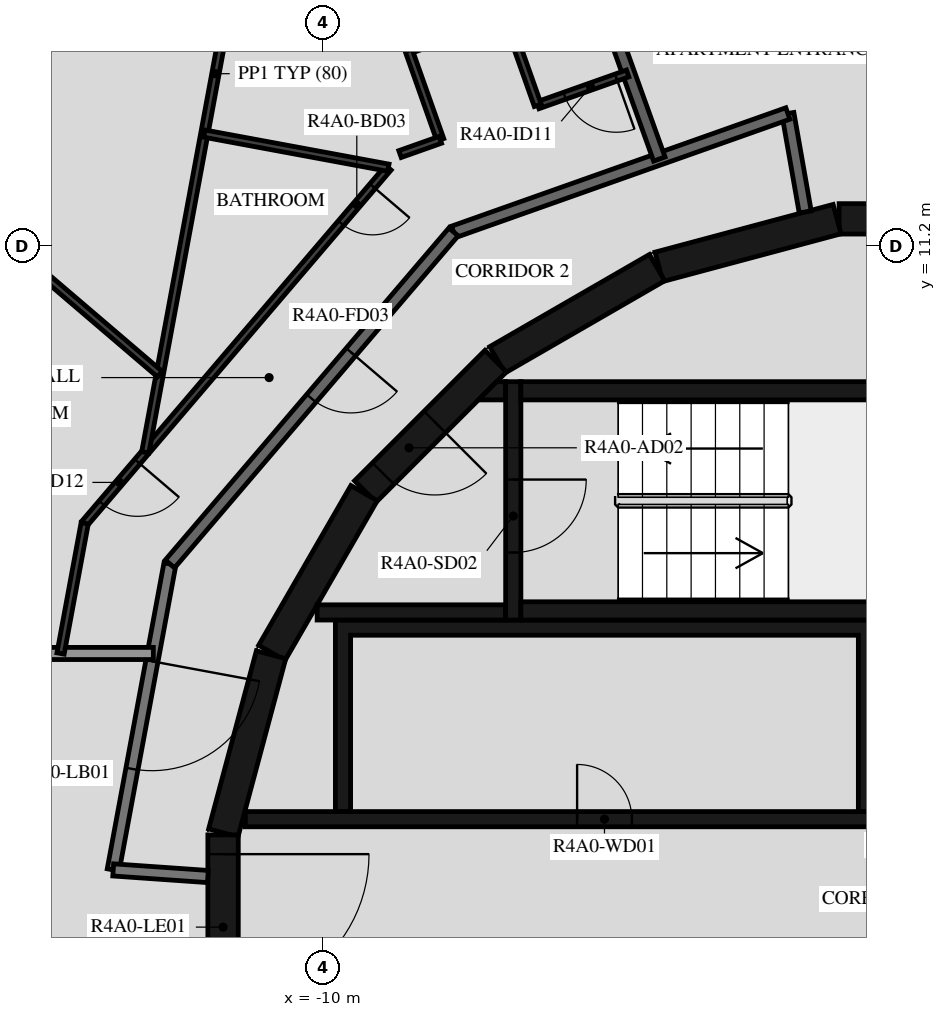
"""IFC4 building model, lengths in metres.
Left out: names, types, materials, properties, quantities, classifications, styles, units other than length and angle.
Written with IfcOpenShell. Run it as: python <this file> out.ifc"""

import sys

from ifc_helpers import new_model, si_unit, direction, frame, frame_2d, origin, place, context, subcontext, project, spatial, polyline, rectangle, outline, extrude, element, fill, save


model = new_model("IFC4")
c1 = context("Model", 3, precision=1e-05, world=origin(), true_north=direction((0.0, 1.0)))
c2 = subcontext(c1, "Body", "Model", "MODEL_VIEW")
j1 = project(units=[si_unit("LENGTHUNIT", "METRE"), si_unit("PLANEANGLEUNIT", "RADIAN")], contexts=[c1])
p1 = place(None, origin())
s1 = spatial("IfcSite", under=j1, at=p1, CompositionType="ELEMENT")
p2 = place(p1, origin())
s2 = spatial("IfcBuilding", under=s1, at=p2, CompositionType="ELEMENT")
p3 = place(p2, frame((0.0, 0.0, 151.7)))
s3 = spatial("IfcBuildingStorey", under=s2, at=p3, CompositionType="ELEMENT", Elevation=151.7)
for number, where, z_axis, x_axis in (
    (1, (1.516, 11.647, 0.0), (0.0, 0.0, 1.0), (-1.0, 0.0, 0.0)),
    (2, (-1.55, 11.643, 0.0), (0.0, 0.0, 1.0), (-0.966, -0.259, 0.0)),
    (3, (-4.51, 10.845, 0.0), (0.0, 0.0, 1.0), (-0.866, -0.5, 0.0)),
):
    element("IfcWall", number, at=place(p3, frame(where, z_axis=z_axis, x_axis=x_axis)), inside=s3, PredefinedType="SHEAR", context=c2, shape_type="SweptSolid", body=[
        extrude(rectangle(XDim=3.033, YDim=0.5, at=frame_2d((1.516, 0.0))), origin(), (0.0, 0.0, 1.0), 3.12),
    ])
p4 = place(p3, frame((-7.164, 9.308, 0.0), z_axis=(0.0, 0.0, 1.0), x_axis=(-0.707106781187, -0.707106781187, 0.0)))
e4 = element("IfcWall", 4, at=p4, inside=s3, PredefinedType="SHEAR", context=c2, shape_type="SweptSolid", body=[
    extrude(rectangle(XDim=3.032, YDim=0.5, at=frame_2d((1.516, 0.0))), origin(), (0.0, 0.0, 1.0), 3.12),
])
p5 = place(p4, frame((1.416, 0.0, 0.0)))
e5 = element("IfcOpeningElement", 5, at=p5, cuts=e4, PredefinedType="OPENING", context=c2, shape_type="SweptSolid", body=[
    extrude(rectangle(XDim=1.2, YDim=2.1, at=frame_2d((0.6, 1.05))), frame((0.0, 0.26, 0.0), z_axis=(0.0, -1.0, 0.0), x_axis=(1.0, 0.0, 0.0)), (0.0, 0.0, 1.0), 0.52),
])
for number, where, z_axis, x_axis in (
    (6, (-9.329, 7.137, 0.0), (0.0, 0.0, 1.0), (-0.5, -0.866, 0.0)),
    (7, (-10.858, 4.479, 0.0), (0.0, 0.0, 1.0), (-0.259, -0.966, 0.0)),
):
    element("IfcWall", number, at=place(p3, frame(where, z_axis=z_axis, x_axis=x_axis)), inside=s3, PredefinedType="SHEAR", context=c2, shape_type="SweptSolid", body=[
        extrude(rectangle(XDim=3.033, YDim=0.5, at=frame_2d((1.516, 0.0))), origin(), (0.0, 0.0, 1.0), 3.12),
    ])
p6 = place(p3, frame((-11.647, 1.516, 0.0), z_axis=(0.0, 0.0, 1.0), x_axis=(0.0, -1.0, 0.0)))
e8 = element("IfcWall", 8, at=p6, inside=s3, PredefinedType="SHEAR", context=c2, shape_type="SweptSolid", body=[
    extrude(rectangle(XDim=3.033, YDim=0.5, at=frame_2d((1.516, 0.0))), origin(), (0.0, 0.0, 1.0), 3.12),
])
p7 = place(p6, frame((0.316, 0.0, 0.0)))
e9 = element("IfcOpeningElement", 9, at=p7, cuts=e8, PredefinedType="OPENING", context=c2, shape_type="SweptSolid", body=[
    extrude(rectangle(XDim=2.4, YDim=2.1, at=frame_2d((1.2, 1.05))), frame((0.0, 0.26, 0.0), z_axis=(0.0, -1.0, 0.0), x_axis=(1.0, 0.0, 0.0)), (0.0, 0.0, 1.0), 0.52),
])
for number, where, z_axis, x_axis in (
    (10, (-6.75, 5.2, 0.0), (0.0, 0.0, 1.0), (1.0, 0.0, 0.0)),
    (11, (-6.75, 8.82, 0.0), (0.0, 0.0, 1.0), (1.0, 0.0, 0.0)),
):
    element("IfcWall", number, at=place(p3, frame(where, z_axis=z_axis, x_axis=x_axis)), inside=s3, PredefinedType="SHEAR", context=c2, shape_type="SweptSolid", body=[
        extrude(rectangle(XDim=6.75, YDim=0.3, at=frame_2d((3.375, 0.0))), origin(), (0.0, 0.0, 1.0), 3.12),
    ])
p8 = place(p3, frame((-6.875, 8.97, 0.0), z_axis=(0.0, 0.0, 1.0), x_axis=(0.0, -1.0, 0.0)))
e12 = element("IfcWall", 12, at=p8, inside=s3, PredefinedType="SHEAR", context=c2, shape_type="SweptSolid", body=[
    extrude(rectangle(XDim=3.92, YDim=0.25, at=frame_2d((1.96, 0.0))), origin(), (0.0, 0.0, 1.0), 3.12),
])
p9 = place(p8, frame((1.61, 0.0, 0.0)))
e13 = element("IfcOpeningElement", 13, at=p9, cuts=e12, PredefinedType="OPENING", context=c2, shape_type="SweptSolid", body=[
    extrude(rectangle(XDim=1.2, YDim=2.1, at=frame_2d((0.6, 1.05))), frame((0.0, 0.135, 0.0), z_axis=(0.0, -1.0, 0.0), x_axis=(1.0, 0.0, 0.0)), (0.0, 0.0, 1.0), 0.27),
])
p10 = place(p3, frame((-7.0, 5.175, 0.0), z_axis=(0.0, 0.0, 1.0), x_axis=(-1.0, 0.0, 0.0)))
e14 = element("IfcWall", 14, at=p10, inside=s3, PredefinedType="SHEAR", context=c2, shape_type="SweptSolid", body=[
    extrude(rectangle(XDim=3.1, YDim=0.25, at=frame_2d((1.55, 0.0))), origin(), (0.0, 0.0, 1.0), 3.12),
])
p11 = place(p3, origin())
e15 = element("IfcWall", 15, at=p11, inside=s3, PredefinedType="SHEAR", context=c2, shape_type="SweptSolid", body=[
    extrude(outline(polyline([(-7.148, 8.97), (-7.0, 8.97), (-7.0, 8.67), (-7.448, 8.67), (-7.148, 8.97)])), origin(), (0.0, 0.0, 1.0), 3.12),
])
p12 = place(p3, origin())
e16 = element("IfcWall", 16, at=p12, inside=s3, PredefinedType="SHEAR", context=c2, shape_type="SweptSolid", body=[
    extrude(outline(polyline([(-9.55, 4.8), (-1.2, 4.8), (-1.2, 1.9), (-0.95, 1.9), (-0.95, 4.8), (0.95, 4.8), (0.95, 1.9), (1.2, 1.9), (1.2, 4.8), (3.1, 4.8), (3.1, 1.9), (3.35, 1.9), (3.35, 4.8), (5.25, 4.8), (5.25, 1.9), (5.5, 1.9), (5.5, 4.8), (7.4, 4.8), (7.4, 1.9), (7.65, 1.9), (7.65, 4.8), (9.55, 4.8), (9.55, 1.9), (9.8, 1.9), (9.8, 4.8), (9.8, 5.05), (-9.8, 5.05), (-9.8, 4.8), (-9.8, 1.9), (-9.55, 1.9), (-9.55, 4.8)])), origin(), (0.0, 0.0, 1.0), 3.12),
])
p13 = place(p3, frame((-11.28, 1.775, 0.0), z_axis=(0.0, 0.0, 1.0), x_axis=(1.0, 0.0, 0.0)))
e17 = element("IfcWall", 17, at=p13, inside=s3, PredefinedType="SHEAR", context=c2, shape_type="SweptSolid", body=[
    extrude(rectangle(XDim=14.38, YDim=0.25, at=frame_2d((7.19, 0.0))), origin(), (0.0, 0.0, 1.0), 3.12),
])
p14 = place(p13, frame((10.73, 0.0, 0.0)))
e18 = element("IfcOpeningElement", 18, at=p14, cuts=e17, PredefinedType="OPENING", context=c2, shape_type="SweptSolid", body=[
    extrude(rectangle(XDim=1.1, YDim=2.1, at=frame_2d((0.55, 1.05))), frame((0.0, 0.135, 0.0), z_axis=(0.0, -1.0, 0.0), x_axis=(1.0, 0.0, 0.0)), (0.0, 0.0, 1.0), 0.27),
])
p15 = place(p13, frame((12.88, 0.0, 0.0)))
e19 = element("IfcOpeningElement", 19, at=p15, cuts=e17, PredefinedType="OPENING", context=c2, shape_type="SweptSolid", body=[
    extrude(rectangle(XDim=1.1, YDim=2.1, at=frame_2d((0.55, 1.05))), frame((0.0, 0.135, 0.0), z_axis=(0.0, -1.0, 0.0), x_axis=(1.0, 0.0, 0.0)), (0.0, 0.0, 1.0), 0.27),
])
p16 = place(p13, frame((5.455, 0.0, 0.0)))
e20 = element("IfcOpeningElement", 20, at=p16, cuts=e17, PredefinedType="OPENING", context=c2, shape_type="SweptSolid", body=[
    extrude(rectangle(XDim=0.9, YDim=2.1, at=frame_2d((0.45, 1.05))), frame((0.0, 0.135, 0.0), z_axis=(0.0, -1.0, 0.0), x_axis=(1.0, 0.0, 0.0)), (0.0, 0.0, 1.0), 0.27),
])
p17 = place(p3, frame((-12.521, 5.972, 0.0), z_axis=(0.0, 0.0, 1.0), x_axis=(-0.182251559718, -0.983251935661, 0.0)))
e21 = element("IfcWall", 21, at=p17, inside=s3, PredefinedType="STANDARD", context=c2, shape_type="SweptSolid", body=[
    extrude(rectangle(XDim=5.117, YDim=0.2, at=frame_2d((2.559, 0.0))), origin(), (0.0, 0.0, 1.0), 3.12),
])
p18 = place(p17, frame((1.627, 0.0, 0.0)))
e22 = element("IfcOpeningElement", 22, at=p18, cuts=e21, PredefinedType="OPENING", context=c2, shape_type="SweptSolid", body=[
    extrude(rectangle(XDim=1.8, YDim=2.1, at=frame_2d((0.9, 1.05))), frame((0.0, 0.11, 0.0), z_axis=(0.0, -1.0, 0.0), x_axis=(1.0, 0.0, 0.0)), (0.0, 0.0, 1.0), 0.22),
])
p19 = place(p3, frame((-13.454, 0.941, 0.0), z_axis=(0.0, 0.0, 1.0), x_axis=(0.99755155062, -0.069934997354, 0.0)))
e23 = element("IfcWall", 23, at=p19, inside=s3, PredefinedType="STANDARD", context=c2, shape_type="SweptSolid", body=[
    extrude(rectangle(XDim=1.561, YDim=0.2, at=frame_2d((0.78, 0.0))), origin(), (0.0, 0.0, 1.0), 3.12),
])
p20 = place(p3, frame((-2.074, 11.761, 0.0), z_axis=(0.0, 0.0, 1.0), x_axis=(-0.1736412798, 0.984808969267, 0.0)))
e24 = element("IfcWall", 24, at=p20, inside=s3, PredefinedType="STANDARD", context=c2, shape_type="SweptSolid", body=[
    extrude(rectangle(XDim=1.644, YDim=0.2, at=frame_2d((0.822, 0.0))), origin(), (0.0, 0.0, 1.0), 3.12),
])
p21 = place(p3, frame((-2.359, 13.38, 0.0), z_axis=(0.0, 0.0, 1.0), x_axis=(-0.942647529236, -0.333789807551, 0.0)))
e25 = element("IfcWall", 25, at=p21, inside=s3, PredefinedType="STANDARD", context=c2, shape_type="SweptSolid", body=[
    extrude(rectangle(XDim=5.833, YDim=0.2, at=frame_2d((2.917, 0.0))), origin(), (0.0, 0.0, 1.0), 3.12),
])
p22 = place(p3, frame((-7.858, 11.433, 0.0), z_axis=(0.0, 0.0, 1.0), x_axis=(-0.649440801937, -0.760412154545, 0.0)))
e26 = element("IfcWall", 26, at=p22, inside=s3, PredefinedType="STANDARD", context=c2, shape_type="SweptSolid", body=[
    extrude(rectangle(XDim=7.181, YDim=0.2, at=frame_2d((3.59, 0.0))), origin(), (0.0, 0.0, 1.0), 3.12),
])
p23 = place(p22, frame((2.6, 0.0, 0.0)))
e27 = element("IfcOpeningElement", 27, at=p23, cuts=e26, PredefinedType="OPENING", context=c2, shape_type="SweptSolid", body=[
    extrude(rectangle(XDim=1.0, YDim=2.1, at=frame_2d((0.5, 1.05))), frame((0.0, 0.11, 0.0), z_axis=(0.0, -1.0, 0.0), x_axis=(1.0, 0.0, 0.0)), (0.0, 0.0, 1.0), 0.22),
])
p24 = place(p3, frame((-12.794, 4.5, 0.0), z_axis=(0.0, 0.0, 1.0), x_axis=(-1.0, 0.0, 0.0)))
e28 = element("IfcWall", 28, at=p24, inside=s3, PredefinedType="STANDARD", context=c2, shape_type="SweptSolid", body=[
    extrude(rectangle(XDim=5.106, YDim=0.2, at=frame_2d((2.553, 0.0))), origin(), (0.0, 0.0, 1.0), 2.73),
])
p25 = place(p3, frame((-6.185, 17.402, 0.0), z_axis=(0.0, 0.0, 1.0), x_axis=(0.337736730281, -0.941240618024, 0.0)))
e29 = element("IfcWall", 29, at=p25, inside=s3, PredefinedType="STANDARD", context=c2, shape_type="SweptSolid", body=[
    extrude(rectangle(XDim=5.068, YDim=0.2, at=frame_2d((2.534, 0.0))), origin(), (0.0, 0.0, 1.0), 3.12),
])
p26 = place(p3, frame((8.702, 12.206, 0.0), z_axis=(0.0, 0.0, 1.0), x_axis=(-0.760401313718, 0.649453494945, 0.0)))
e30 = element("IfcWall", 30, at=p26, inside=s3, PredefinedType="PARTITIONING", context=c2, shape_type="SweptSolid", body=[
    extrude(rectangle(XDim=16.724, YDim=0.12, at=frame_2d((8.362, 0.0))), origin(), (0.0, 0.0, 1.0), 3.12),
])
p27 = place(p26, frame((0.2, 0.0, 0.0)))
e31 = element("IfcOpeningElement", 31, at=p27, cuts=e30, PredefinedType="OPENING", context=c2, shape_type="SweptSolid", body=[
    extrude(rectangle(XDim=0.9, YDim=2.1, at=frame_2d((0.45, 1.05))), frame((0.0, 0.07, 0.0), z_axis=(0.0, -1.0, 0.0), x_axis=(1.0, 0.0, 0.0)), (0.0, 0.0, 1.0), 0.14),
])
p28 = place(p26, frame((7.099, 0.0, 0.0)))
e32 = element("IfcOpeningElement", 32, at=p28, cuts=e30, PredefinedType="OPENING", context=c2, shape_type="SweptSolid", body=[
    extrude(rectangle(XDim=0.9, YDim=2.1, at=frame_2d((0.45, 1.05))), frame((0.0, 0.07, 0.0), z_axis=(0.0, -1.0, 0.0), x_axis=(1.0, 0.0, 0.0)), (0.0, 0.0, 1.0), 0.14),
])
p29 = place(p3, frame((6.641, 13.923, 0.0), z_axis=(0.0, 0.0, 1.0), x_axis=(-0.983250157272, 0.182261153912, 0.0)))
e33 = element("IfcWall", 33, at=p29, inside=s3, PredefinedType="PARTITIONING", context=c2, shape_type="SweptSolid", body=[
    extrude(rectangle(XDim=7.985, YDim=0.12, at=frame_2d((3.992, 0.0))), origin(), (0.0, 0.0, 1.0), 3.12),
])
p30 = place(p29, frame((1.4, 0.0, 0.0)))
e34 = element("IfcOpeningElement", 34, at=p30, cuts=e33, PredefinedType="OPENING", context=c2, shape_type="SweptSolid", body=[
    extrude(rectangle(XDim=0.8, YDim=2.1, at=frame_2d((0.4, 1.05))), frame((0.0, 0.07, 0.0), z_axis=(0.0, -1.0, 0.0), x_axis=(1.0, 0.0, 0.0)), (0.0, 0.0, 1.0), 0.14),
])
p31 = place(p29, frame((5.069, 0.0, 0.0)))
e35 = element("IfcOpeningElement", 35, at=p31, cuts=e33, PredefinedType="OPENING", context=c2, shape_type="SweptSolid", body=[
    extrude(rectangle(XDim=0.9, YDim=2.1, at=frame_2d((0.45, 1.05))), frame((0.0, 0.07, 0.0), z_axis=(0.0, -1.0, 0.0), x_axis=(1.0, 0.0, 0.0)), (0.0, 0.0, 1.0), 0.14),
])
p32 = place(p3, frame((-4.993, 14.038, 0.0), z_axis=(0.0, 0.0, 1.0), x_axis=(-0.942685371668, -0.333682918418, 0.0)))
e36 = element("IfcWall", 36, at=p32, inside=s3, PredefinedType="PARTITIONING", context=c2, shape_type="SweptSolid", body=[
    extrude(rectangle(XDim=1.569, YDim=0.12, at=frame_2d((0.784, 0.0))), origin(), (0.0, 0.0, 1.0), 3.12),
])
p33 = place(p32, frame((0.2, 0.0, 0.0)))
e37 = element("IfcOpeningElement", 37, at=p33, cuts=e36, PredefinedType="OPENING", context=c2, shape_type="SweptSolid", body=[
    extrude(rectangle(XDim=0.9, YDim=2.1, at=frame_2d((0.45, 1.05))), frame((0.0, 0.07, 0.0), z_axis=(0.0, -1.0, 0.0), x_axis=(1.0, 0.0, 0.0)), (0.0, 0.0, 1.0), 0.14),
])
p34 = place(p3, frame((-6.472, 13.515, 0.0), z_axis=(0.0, 0.0, 1.0), x_axis=(-0.333809516424, 0.942640550127, 0.0)))
e38 = element("IfcWall", 38, at=p34, inside=s3, PredefinedType="PARTITIONING", context=c2, shape_type="SweptSolid", body=[
    extrude(rectangle(XDim=1.562, YDim=0.12, at=frame_2d((0.781, 0.0))), origin(), (0.0, 0.0, 1.0), 3.12),
])
p35 = place(p3, frame((-6.993, 14.987, 0.0), z_axis=(0.0, 0.0, 1.0), x_axis=(-0.942599915297, -0.33392424243, 0.0)))
e39 = element("IfcWall", 39, at=p35, inside=s3, PredefinedType="PARTITIONING", context=c2, shape_type="SweptSolid", body=[
    extrude(rectangle(XDim=1.7, YDim=0.12, at=frame_2d((0.85, 0.0))), origin(), (0.0, 0.0, 1.0), 3.12),
])
p36 = place(p3, frame((-8.596, 14.419, 0.0), z_axis=(0.0, 0.0, 1.0), x_axis=(0.333670576497, -0.942689740254, 0.0)))
e40 = element("IfcWall", 40, at=p36, inside=s3, PredefinedType="PARTITIONING", context=c2, shape_type="SweptSolid", body=[
    extrude(rectangle(XDim=1.562, YDim=0.12, at=frame_2d((0.781, 0.0))), origin(), (0.0, 0.0, 1.0), 3.12),
])
p37 = place(p3, frame((-8.075, 12.947, 0.0), z_axis=(0.0, 0.0, 1.0), x_axis=(-0.942649994227, -0.33378284615, 0.0)))
e41 = element("IfcWall", 41, at=p37, inside=s3, PredefinedType="PARTITIONING", context=c2, shape_type="SweptSolid", body=[
    extrude(rectangle(XDim=0.703, YDim=0.12, at=frame_2d((0.352, 0.0))), origin(), (0.0, 0.0, 1.0), 3.12),
])
p38 = place(p3, frame((-8.929, 12.488, 0.0), z_axis=(0.0, 0.0, 1.0), x_axis=(-0.64944646045, -0.760407321775, 0.0)))
e42 = element("IfcWall", 42, at=p38, inside=s3, PredefinedType="PARTITIONING", context=c2, shape_type="SweptSolid", body=[
    extrude(rectangle(XDim=7.69, YDim=0.12, at=frame_2d((3.845, 0.0))), origin(), (0.0, 0.0, 1.0), 3.12),
])
p39 = place(p38, frame((0.4, 0.0, 0.0)))
e43 = element("IfcOpeningElement", 43, at=p39, cuts=e42, PredefinedType="OPENING", context=c2, shape_type="SweptSolid", body=[
    extrude(rectangle(XDim=0.8, YDim=2.1, at=frame_2d((0.4, 1.05))), frame((0.0, 0.07, 0.0), z_axis=(0.0, -1.0, 0.0), x_axis=(1.0, 0.0, 0.0)), (0.0, 0.0, 1.0), 0.14),
])
p40 = place(p38, frame((6.356, 0.0, 0.0)))
e44 = element("IfcOpeningElement", 44, at=p40, cuts=e42, PredefinedType="OPENING", context=c2, shape_type="SweptSolid", body=[
    extrude(rectangle(XDim=0.9, YDim=2.1, at=frame_2d((0.45, 1.05))), frame((0.0, 0.07, 0.0), z_axis=(0.0, -1.0, 0.0), x_axis=(1.0, 0.0, 0.0)), (0.0, 0.0, 1.0), 0.14),
])
p41 = place(p3, frame((-13.923, 6.641, 0.0), z_axis=(0.0, 0.0, 1.0), x_axis=(-0.182209715759, -0.983259690765, 0.0)))
e45 = element("IfcWall", 45, at=p41, inside=s3, PredefinedType="PARTITIONING", context=c2, shape_type="SweptSolid", body=[
    extrude(rectangle(XDim=2.177, YDim=0.12, at=frame_2d((1.089, 0.0))), origin(), (0.0, 0.0, 1.0), 3.12),
])
p42 = place(p3, frame((-10.618, 20.262, 0.0), z_axis=(0.0, 0.0, 1.0), x_axis=(-0.182222468274, -0.983257327487, 0.0)))
e46 = element("IfcWall", 46, at=p42, inside=s3, PredefinedType="PARTITIONING", context=c2, shape_type="SweptSolid", body=[
    extrude(rectangle(XDim=12.667, YDim=0.12, at=frame_2d((6.333, 0.0))), origin(), (0.0, 0.0, 1.0), 3.12),
])
p43 = place(p42, frame((2.57, 0.0, 0.0)))
e47 = element("IfcOpeningElement", 47, at=p43, cuts=e46, PredefinedType="OPENING", context=c2, shape_type="SweptSolid", body=[
    extrude(rectangle(XDim=0.9, YDim=2.1, at=frame_2d((0.45, 1.05))), frame((0.0, 0.07, 0.0), z_axis=(0.0, -1.0, 0.0), x_axis=(1.0, 0.0, 0.0)), (0.0, 0.0, 1.0), 0.14),
])
p44 = place(p3, frame((-11.955, 13.049, 0.0), z_axis=(0.0, 0.0, 1.0), x_axis=(0.983247271586, -0.182276720725, 0.0)))
e48 = element("IfcWall", 48, at=p44, inside=s3, PredefinedType="PARTITIONING", context=c2, shape_type="SweptSolid", body=[
    extrude(rectangle(XDim=3.078, YDim=0.12, at=frame_2d((1.539, 0.0))), origin(), (0.0, 0.0, 1.0), 3.12),
])
p45 = place(p3, frame((-16.552, 12.394, 0.0), z_axis=(0.0, 0.0, 1.0), x_axis=(0.760425586578, -0.649425074414, 0.0)))
e49 = element("IfcWall", 49, at=p45, inside=s3, PredefinedType="PARTITIONING", context=c2, shape_type="SweptSolid", body=[
    extrude(rectangle(XDim=5.081, YDim=0.12, at=frame_2d((2.541, 0.0))), origin(), (0.0, 0.0, 1.0), 3.12),
])
p46 = place(p9, origin())
e50 = element("IfcDoor", 50, at=p46, inside=s3, OperationType="SINGLE_SWING_LEFT", PredefinedType="DOOR", context=c2, shape_type="SweptSolid", body=[
    extrude(rectangle(XDim=1.2, YDim=2.1, at=frame_2d((0.6, 1.05))), frame((0.0, 0.025, 0.0), z_axis=(0.0, -1.0, 0.0), x_axis=(1.0, 0.0, 0.0)), (0.0, 0.0, 1.0), 0.05),
])
fill(e13, e50)
p47 = place(p5, origin())
e51 = element("IfcDoor", 51, at=p47, inside=s3, OperationType="SINGLE_SWING_RIGHT", PredefinedType="DOOR", context=c2, shape_type="SweptSolid", body=[
    extrude(rectangle(XDim=1.2, YDim=2.1, at=frame_2d((0.6, 1.05))), frame((0.0, 0.025, 0.0), z_axis=(0.0, -1.0, 0.0), x_axis=(1.0, 0.0, 0.0)), (0.0, 0.0, 1.0), 0.05),
])
fill(e5, e51)
p48 = place(p7, origin())
e52 = element("IfcDoor", 52, at=p48, inside=s3, OperationType="DOUBLE_DOOR_SINGLE_SWING", PredefinedType="DOOR", context=c2, shape_type="SweptSolid", body=[
    extrude(rectangle(XDim=2.4, YDim=2.1, at=frame_2d((1.2, 1.05))), frame((0.0, 0.025, 0.0), z_axis=(0.0, -1.0, 0.0), x_axis=(1.0, 0.0, 0.0)), (0.0, 0.0, 1.0), 0.05),
])
fill(e9, e52)
p49 = place(p16, origin())
e53 = element("IfcDoor", 53, at=p49, inside=s3, OperationType="SINGLE_SWING_LEFT", PredefinedType="DOOR", context=c2, shape_type="SweptSolid", body=[
    extrude(rectangle(XDim=0.9, YDim=2.1, at=frame_2d((0.45, 1.05))), frame((0.0, 0.025, 0.0), z_axis=(0.0, -1.0, 0.0), x_axis=(1.0, 0.0, 0.0)), (0.0, 0.0, 1.0), 0.05),
])
fill(e20, e53)
p50 = place(p23, origin())
e54 = element("IfcDoor", 54, at=p50, inside=s3, OperationType="SINGLE_SWING_LEFT", PredefinedType="DOOR", context=c2, shape_type="SweptSolid", body=[
    extrude(rectangle(XDim=1.0, YDim=2.1, at=frame_2d((0.5, 1.05))), frame((0.0, 0.025, 0.0), z_axis=(0.0, -1.0, 0.0), x_axis=(1.0, 0.0, 0.0)), (0.0, 0.0, 1.0), 0.05),
])
fill(e27, e54)
p51 = place(p33, origin())
e55 = element("IfcDoor", 55, at=p51, inside=s3, OperationType="SINGLE_SWING_LEFT", PredefinedType="DOOR", context=c2, shape_type="SweptSolid", body=[
    extrude(rectangle(XDim=0.9, YDim=2.1, at=frame_2d((0.45, 1.05))), frame((0.0, 0.025, 0.0), z_axis=(0.0, -1.0, 0.0), x_axis=(1.0, 0.0, 0.0)), (0.0, 0.0, 1.0), 0.05),
])
fill(e37, e55)
p52 = place(p39, origin())
e56 = element("IfcDoor", 56, at=p52, inside=s3, OperationType="SINGLE_SWING_LEFT", PredefinedType="DOOR", context=c2, shape_type="SweptSolid", body=[
    extrude(rectangle(XDim=0.8, YDim=2.1, at=frame_2d((0.4, 1.05))), frame((0.0, 0.025, 0.0), z_axis=(0.0, -1.0, 0.0), x_axis=(1.0, 0.0, 0.0)), (0.0, 0.0, 1.0), 0.05),
])
fill(e43, e56)
p53 = place(p40, origin())
e57 = element("IfcDoor", 57, at=p53, inside=s3, OperationType="SINGLE_SWING_LEFT", PredefinedType="DOOR", context=c2, shape_type="SweptSolid", body=[
    extrude(rectangle(XDim=0.9, YDim=2.1, at=frame_2d((0.45, 1.05))), frame((0.0, 0.025, 0.0), z_axis=(0.0, -1.0, 0.0), x_axis=(1.0, 0.0, 0.0)), (0.0, 0.0, 1.0), 0.05),
])
fill(e44, e57)
p54 = place(p18, origin())
e58 = element("IfcDoor", 58, at=p54, inside=s3, OperationType="DOUBLE_DOOR_SINGLE_SWING", PredefinedType="DOOR", context=c2, shape_type="SweptSolid", body=[
    extrude(rectangle(XDim=1.8, YDim=2.1, at=frame_2d((0.9, 1.05))), frame((0.0, 0.025, 0.0), z_axis=(0.0, -1.0, 0.0), x_axis=(1.0, 0.0, 0.0)), (0.0, 0.0, 1.0), 0.05),
])
fill(e22, e58)
save(model, sys.argv[1])
